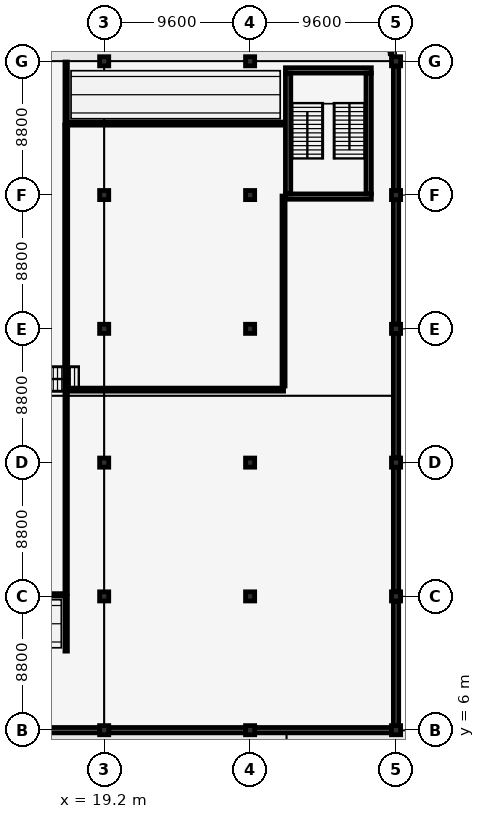
"""IFC4 building model, lengths in metres.
Left out: names, types, materials, properties, quantities, classifications, styles, units other than length and angle.
Written with IfcOpenShell. Run it as: python <this file> out.ifc"""

import sys

from ifc_helpers import new_model, si_unit, direction, frame, frame_2d, origin, origin_2d, place, context, subcontext, project, spatial, rectangle, extrude, element, fill, save


model = new_model("IFC4")
c1 = context("Model", 3, precision=1e-05, world=origin(), true_north=direction((0.0, 1.0)))
c2 = subcontext(c1, "Body", "Model", "MODEL_VIEW")
j1 = project(units=[si_unit("LENGTHUNIT", "METRE"), si_unit("PLANEANGLEUNIT", "RADIAN")], contexts=[c1])
p1 = place(None, origin())
s1 = spatial("IfcSite", under=j1, at=p1, CompositionType="ELEMENT")
p2 = place(p1, origin())
s2 = spatial("IfcBuilding", under=s1, at=p2, CompositionType="ELEMENT")
p3 = place(p2, origin())
s3 = spatial("IfcBuildingStorey", under=s2, at=p3, CompositionType="ELEMENT", Elevation=0.0)
for number, where, z_axis, x_axis in (
    (1, (19.2, 6.0, 0.0), (0.0, 0.0, 1.0), (1.0, 0.0, 0.0)),
    (2, (19.2, 14.8, 0.0), (0.0, 0.0, 1.0), (1.0, 0.0, 0.0)),
    (3, (19.2, 23.6, 0.0), (0.0, 0.0, 1.0), (1.0, 0.0, 0.0)),
    (4, (19.2, 32.4, 0.0), (0.0, 0.0, 1.0), (1.0, 0.0, 0.0)),
    (5, (19.2, 41.2, 0.0), (0.0, 0.0, 1.0), (1.0, 0.0, 0.0)),
    (6, (19.2, 50.0, 0.0), (0.0, 0.0, 1.0), (1.0, 0.0, 0.0)),
    (7, (28.8, 6.0, 0.0), (0.0, 0.0, 1.0), (1.0, 0.0, 0.0)),
    (8, (28.8, 14.8, 0.0), (0.0, 0.0, 1.0), (1.0, 0.0, 0.0)),
    (9, (28.8, 23.6, 0.0), (0.0, 0.0, 1.0), (1.0, 0.0, 0.0)),
    (10, (28.8, 32.4, 0.0), (0.0, 0.0, 1.0), (1.0, 0.0, 0.0)),
    (11, (28.8, 41.2, 0.0), (0.0, 0.0, 1.0), (1.0, 0.0, 0.0)),
    (12, (28.8, 50.0, 0.0), (0.0, 0.0, 1.0), (1.0, 0.0, 0.0)),
    (13, (38.4, 6.0, 0.0), (0.0, 0.0, 1.0), (1.0, 0.0, 0.0)),
    (14, (38.4, 14.8, 0.0), (0.0, 0.0, 1.0), (1.0, 0.0, 0.0)),
    (15, (38.4, 23.6, 0.0), (0.0, 0.0, 1.0), (1.0, 0.0, 0.0)),
    (16, (38.4, 32.4, 0.0), (0.0, 0.0, 1.0), (1.0, 0.0, 0.0)),
    (17, (38.4, 41.2, 0.0), (0.0, 0.0, 1.0), (1.0, 0.0, 0.0)),
    (18, (38.4, 50.0, 0.0), (0.0, 0.0, 1.0), (1.0, 0.0, 0.0)),
):
    element("IfcColumn", number, at=place(p3, frame(where, z_axis=z_axis, x_axis=x_axis)), inside=s3, PredefinedType="COLUMN", context=c2, shape_type="SweptSolid", body=[
        extrude(rectangle(XDim=0.6, YDim=0.6, at=origin_2d()), origin(), (0.0, 0.0, 1.0), 4.8),
    ])
p4 = place(p3, frame((9.9, 6.0, 0.0), z_axis=(0.0, 0.0, 1.0), x_axis=(1.0, 0.0, 0.0)))
e19 = element("IfcWall", 19, at=p4, inside=s3, PredefinedType="SOLIDWALL", context=c2, shape_type="SweptSolid", body=[
    extrude(rectangle(XDim=9.0, YDim=0.35, at=frame_2d((4.5, 0.0))), origin(), (0.0, 0.0, 1.0), 4.1),
])
p5 = place(p4, frame((1.6, 0.0, 0.0)))
e20 = element("IfcOpeningElement", 20, at=p5, cuts=e19, PredefinedType="OPENING", context=c2, shape_type="SweptSolid", body=[
    extrude(rectangle(XDim=1.96, YDim=2.37, at=frame_2d((0.98, 1.185))), frame((0.0, 0.185, 0.0), z_axis=(0.0, -1.0, 0.0), x_axis=(1.0, 0.0, 0.0)), (0.0, 0.0, 1.0), 0.37),
])
p6 = place(p4, frame((5.0, 0.0, 0.0)))
e21 = element("IfcOpeningElement", 21, at=p6, cuts=e19, PredefinedType="OPENING", context=c2, shape_type="SweptSolid", body=[
    extrude(rectangle(XDim=1.92, YDim=2.34, at=frame_2d((0.96, 1.17))), frame((0.0, 0.185, 0.0), z_axis=(0.0, -1.0, 0.0), x_axis=(1.0, 0.0, 0.0)), (0.0, 0.0, 1.0), 0.37),
])
p7 = place(p3, frame((19.5, 6.0, 0.0), z_axis=(0.0, 0.0, 1.0), x_axis=(1.0, 0.0, 0.0)))
e22 = element("IfcWall", 22, at=p7, inside=s3, PredefinedType="SOLIDWALL", context=c2, shape_type="SweptSolid", body=[
    extrude(rectangle(XDim=9.0, YDim=0.35, at=frame_2d((4.5, 0.0))), origin(), (0.0, 0.0, 1.0), 4.1),
])
p8 = place(p7, frame((3.4, 0.0, 1.0)))
e23 = element("IfcOpeningElement", 23, at=p8, cuts=e22, PredefinedType="OPENING", context=c2, shape_type="SweptSolid", body=[
    extrude(rectangle(XDim=1.8, YDim=1.8, at=frame_2d((0.9, 0.9))), frame((0.0, 0.185, 0.0), z_axis=(0.0, -1.0, 0.0), x_axis=(1.0, 0.0, 0.0)), (0.0, 0.0, 1.0), 0.37),
])
p9 = place(p3, frame((29.1, 6.0, 0.0), z_axis=(0.0, 0.0, 1.0), x_axis=(1.0, 0.0, 0.0)))
e24 = element("IfcWall", 24, at=p9, inside=s3, PredefinedType="SOLIDWALL", context=c2, shape_type="SweptSolid", body=[
    extrude(rectangle(XDim=9.0, YDim=0.35, at=frame_2d((4.5, 0.0))), origin(), (0.0, 0.0, 1.0), 4.1),
])
p10 = place(p9, frame((1.6, 0.0, 0.0)))
e25 = element("IfcOpeningElement", 25, at=p10, cuts=e24, PredefinedType="OPENING", context=c2, shape_type="SweptSolid", body=[
    extrude(rectangle(XDim=1.96, YDim=2.37, at=frame_2d((0.98, 1.185))), frame((0.0, 0.185, 0.0), z_axis=(0.0, -1.0, 0.0), x_axis=(1.0, 0.0, 0.0)), (0.0, 0.0, 1.0), 0.37),
])
p11 = place(p9, frame((5.0, 0.0, 0.0)))
e26 = element("IfcOpeningElement", 26, at=p11, cuts=e24, PredefinedType="OPENING", context=c2, shape_type="SweptSolid", body=[
    extrude(rectangle(XDim=1.92, YDim=2.34, at=frame_2d((0.96, 1.17))), frame((0.0, 0.185, 0.0), z_axis=(0.0, -1.0, 0.0), x_axis=(1.0, 0.0, 0.0)), (0.0, 0.0, 1.0), 0.37),
])
p12 = place(p3, frame((38.4, 6.3, 0.0), z_axis=(0.0, 0.0, 1.0), x_axis=(0.0, 1.0, 0.0)))
e27 = element("IfcWall", 27, at=p12, inside=s3, PredefinedType="SOLIDWALL", context=c2, shape_type="SweptSolid", body=[
    extrude(rectangle(XDim=8.2, YDim=0.35, at=frame_2d((4.1, 0.0))), origin(), (0.0, 0.0, 1.0), 4.1),
])
p13 = place(p12, frame((3.0, 0.0, 0.0)))
e28 = element("IfcOpeningElement", 28, at=p13, cuts=e27, PredefinedType="OPENING", context=c2, shape_type="SweptSolid", body=[
    extrude(rectangle(XDim=1.76, YDim=2.37, at=frame_2d((0.88, 1.185))), frame((0.0, 0.185, 0.0), z_axis=(0.0, -1.0, 0.0), x_axis=(1.0, 0.0, 0.0)), (0.0, 0.0, 1.0), 0.37),
])
p14 = place(p3, frame((38.4, 15.1, 0.0), z_axis=(0.0, 0.0, 1.0), x_axis=(0.0, 1.0, 0.0)))
e29 = element("IfcWall", 29, at=p14, inside=s3, PredefinedType="SOLIDWALL", context=c2, shape_type="SweptSolid", body=[
    extrude(rectangle(XDim=8.2, YDim=0.35, at=frame_2d((4.1, 0.0))), origin(), (0.0, 0.0, 1.0), 4.1),
])
p15 = place(p3, frame((38.4, 23.9, 0.0), z_axis=(0.0, 0.0, 1.0), x_axis=(0.0, 1.0, 0.0)))
e30 = element("IfcWall", 30, at=p15, inside=s3, PredefinedType="SOLIDWALL", context=c2, shape_type="SweptSolid", body=[
    extrude(rectangle(XDim=8.2, YDim=0.35, at=frame_2d((4.1, 0.0))), origin(), (0.0, 0.0, 1.0), 4.1),
])
p16 = place(p15, frame((3.0, 0.0, 0.0)))
e31 = element("IfcOpeningElement", 31, at=p16, cuts=e30, PredefinedType="OPENING", context=c2, shape_type="SweptSolid", body=[
    extrude(rectangle(XDim=1.72, YDim=2.34, at=frame_2d((0.86, 1.17))), frame((0.0, 0.185, 0.0), z_axis=(0.0, -1.0, 0.0), x_axis=(1.0, 0.0, 0.0)), (0.0, 0.0, 1.0), 0.37),
])
p17 = place(p3, frame((38.4, 32.7, 0.0), z_axis=(0.0, 0.0, 1.0), x_axis=(0.0, 1.0, 0.0)))
e32 = element("IfcWall", 32, at=p17, inside=s3, PredefinedType="SOLIDWALL", context=c2, shape_type="SweptSolid", body=[
    extrude(rectangle(XDim=8.2, YDim=0.35, at=frame_2d((4.1, 0.0))), origin(), (0.0, 0.0, 1.0), 4.1),
])
p18 = place(p3, frame((38.4, 41.5, 0.0), z_axis=(0.0, 0.0, 1.0), x_axis=(0.0, 1.0, 0.0)))
e33 = element("IfcWall", 33, at=p18, inside=s3, PredefinedType="SOLIDWALL", context=c2, shape_type="SweptSolid", body=[
    extrude(rectangle(XDim=8.2, YDim=0.35, at=frame_2d((4.1, 0.0))), origin(), (0.0, 0.0, 1.0), 4.1),
])
p19 = place(p18, frame((3.0, 0.0, 0.0)))
e34 = element("IfcOpeningElement", 34, at=p19, cuts=e33, PredefinedType="OPENING", context=c2, shape_type="SweptSolid", body=[
    extrude(rectangle(XDim=1.68, YDim=2.31, at=frame_2d((0.84, 1.155))), frame((0.0, 0.185, 0.0), z_axis=(0.0, -1.0, 0.0), x_axis=(1.0, 0.0, 0.0)), (0.0, 0.0, 1.0), 0.37),
])
for number, where, z_axis, x_axis in (
    (35, (36.775, 41.1, 0.0), (0.0, 0.0, 1.0), (-1.0, 0.0, 0.0)),
    (36, (31.125, 49.4, 0.0), (0.0, 0.0, 1.0), (1.0, 0.0, 0.0)),
):
    element("IfcWall", number, at=place(p3, frame(where, z_axis=z_axis, x_axis=x_axis)), inside=s3, PredefinedType="SHEAR", context=c2, shape_type="SweptSolid", body=[
        extrude(rectangle(XDim=5.65, YDim=0.35, at=frame_2d((2.825, 0.0))), origin(), (0.0, 0.0, 1.0), 4.55),
    ])
p20 = place(p3, frame((31.3, 41.275, 0.0), z_axis=(0.0, 0.0, 1.0), x_axis=(0.0, 1.0, 0.0)))
e37 = element("IfcWall", 37, at=p20, inside=s3, PredefinedType="SHEAR", context=c2, shape_type="SweptSolid", body=[
    extrude(rectangle(XDim=7.95, YDim=0.35, at=frame_2d((3.975, 0.0))), origin(), (0.0, 0.0, 1.0), 4.55),
])
p21 = place(p20, frame((5.1, 0.0, 0.0)))
e38 = element("IfcOpeningElement", 38, at=p21, cuts=e37, PredefinedType="OPENING", context=c2, shape_type="SweptSolid", body=[
    extrude(rectangle(XDim=2.05, YDim=2.15, at=frame_2d((1.025, 1.075))), frame((0.0, 0.185, 0.0), z_axis=(0.0, -1.0, 0.0), x_axis=(1.0, 0.0, 0.0)), (0.0, 0.0, 1.0), 0.37),
])
p22 = place(p3, frame((36.6, 49.225, 0.0), z_axis=(0.0, 0.0, 1.0), x_axis=(0.0, -1.0, 0.0)))
e39 = element("IfcWall", 39, at=p22, inside=s3, PredefinedType="SHEAR", context=c2, shape_type="SweptSolid", body=[
    extrude(rectangle(XDim=7.95, YDim=0.35, at=frame_2d((3.975, 0.0))), origin(), (0.0, 0.0, 1.0), 4.55),
])
p23 = place(p3, frame((16.8, 28.4, 0.0), z_axis=(0.0, 0.0, 1.0), x_axis=(1.0, 0.0, 0.0)))
e40 = element("IfcWall", 40, at=p23, inside=s3, PredefinedType="PARTITIONING", context=c2, shape_type="SweptSolid", body=[
    extrude(rectangle(XDim=14.2, YDim=0.2, at=frame_2d((7.1, 0.0))), origin(), (0.0, 0.0, 1.0), 4.42),
])
p24 = place(p3, frame((16.7, 11.2, 0.0), z_axis=(0.0, 0.0, 1.0), x_axis=(0.0, 1.0, 0.0)))
e41 = element("IfcWall", 41, at=p24, inside=s3, PredefinedType="PARTITIONING", context=c2, shape_type="SweptSolid", body=[
    extrude(rectangle(XDim=3.6, YDim=0.16, at=frame_2d((1.8, 0.0))), origin(), (0.0, 0.0, 1.0), 4.42),
])
p25 = place(p24, frame((0.9, 0.0, 0.0)))
e42 = element("IfcOpeningElement", 42, at=p25, cuts=e41, PredefinedType="OPENING", context=c2, shape_type="SweptSolid", body=[
    extrude(rectangle(XDim=1.8, YDim=2.15, at=frame_2d((0.9, 1.075))), frame((0.0, 0.09, 0.0), z_axis=(0.0, -1.0, 0.0), x_axis=(1.0, 0.0, 0.0)), (0.0, 0.0, 1.0), 0.18),
])
p26 = place(p3, frame((16.7, 15.0, 0.0), z_axis=(0.0, 0.0, 1.0), x_axis=(0.0, 1.0, 0.0)))
e43 = element("IfcWall", 43, at=p26, inside=s3, PredefinedType="PARTITIONING", context=c2, shape_type="SweptSolid", body=[
    extrude(rectangle(XDim=13.3, YDim=0.16, at=frame_2d((6.65, 0.0))), origin(), (0.0, 0.0, 1.0), 4.42),
])
p27 = place(p26, frame((5.75, 0.0, 0.0)))
e44 = element("IfcOpeningElement", 44, at=p27, cuts=e43, PredefinedType="OPENING", context=c2, shape_type="SweptSolid", body=[
    extrude(rectangle(XDim=1.8, YDim=2.15, at=frame_2d((0.9, 1.075))), frame((0.0, 0.09, 0.0), z_axis=(0.0, -1.0, 0.0), x_axis=(1.0, 0.0, 0.0)), (0.0, 0.0, 1.0), 0.18),
])
p28 = place(p3, frame((16.7, 28.5, 0.0), z_axis=(0.0, 0.0, 1.0), x_axis=(0.0, 1.0, 0.0)))
e45 = element("IfcWall", 45, at=p28, inside=s3, PredefinedType="PARTITIONING", context=c2, shape_type="SweptSolid", body=[
    extrude(rectangle(XDim=17.3, YDim=0.2, at=frame_2d((8.65, 0.0))), origin(), (0.0, 0.0, 1.0), 4.42),
])
p29 = place(p28, frame((7.85, 0.0, 0.0)))
e46 = element("IfcOpeningElement", 46, at=p29, cuts=e45, PredefinedType="OPENING", context=c2, shape_type="SweptSolid", body=[
    extrude(rectangle(XDim=1.6, YDim=2.15, at=frame_2d((0.8, 1.075))), frame((0.0, 0.11, 0.0), z_axis=(0.0, -1.0, 0.0), x_axis=(1.0, 0.0, 0.0)), (0.0, 0.0, 1.0), 0.22),
])
p30 = place(p3, frame((16.8, 45.9, 0.0), z_axis=(0.0, 0.0, 1.0), x_axis=(1.0, 0.0, 0.0)))
e47 = element("IfcWall", 47, at=p30, inside=s3, PredefinedType="PARTITIONING", context=c2, shape_type="SweptSolid", body=[
    extrude(rectangle(XDim=14.2, YDim=0.2, at=frame_2d((7.1, 0.0))), origin(), (0.0, 0.0, 1.0), 4.42),
])
p31 = place(p30, frame((6.3, 0.0, 0.0)))
e48 = element("IfcOpeningElement", 48, at=p31, cuts=e47, PredefinedType="OPENING", context=c2, shape_type="SweptSolid", body=[
    extrude(rectangle(XDim=1.6, YDim=2.15, at=frame_2d((0.8, 1.075))), frame((0.0, 0.11, 0.0), z_axis=(0.0, -1.0, 0.0), x_axis=(1.0, 0.0, 0.0)), (0.0, 0.0, 1.0), 0.22),
])
p32 = place(p3, frame((13.4, 14.9, 0.0), z_axis=(0.0, 0.0, 1.0), x_axis=(1.0, 0.0, 0.0)))
e49 = element("IfcWall", 49, at=p32, inside=s3, PredefinedType="PARTITIONING", context=c2, shape_type="SweptSolid", body=[
    extrude(rectangle(XDim=3.2, YDim=0.16, at=frame_2d((1.6, 0.0))), origin(), (0.0, 0.0, 1.0), 3.895),
])
p33 = place(p32, frame((0.7, 0.0, 0.0)))
e50 = element("IfcOpeningElement", 50, at=p33, cuts=e49, PredefinedType="OPENING", context=c2, shape_type="SweptSolid", body=[
    extrude(rectangle(XDim=1.8, YDim=2.15, at=frame_2d((0.9, 1.075))), frame((0.0, 0.09, 0.0), z_axis=(0.0, -1.0, 0.0), x_axis=(1.0, 0.0, 0.0)), (0.0, 0.0, 1.0), 0.18),
])
p34 = place(p3, frame((16.7, 46.0, 0.0), z_axis=(0.0, 0.0, 1.0), x_axis=(0.0, 1.0, 0.0)))
e51 = element("IfcWall", 51, at=p34, inside=s3, PredefinedType="PARTITIONING", context=c2, shape_type="SweptSolid", body=[
    extrude(rectangle(XDim=3.95, YDim=0.16, at=frame_2d((1.975, 0.0))), origin(), (0.0, 0.0, 1.0), 4.42),
])
p35 = place(p34, frame((1.075, 0.0, 0.0)))
e52 = element("IfcOpeningElement", 52, at=p35, cuts=e51, PredefinedType="OPENING", context=c2, shape_type="SweptSolid", body=[
    extrude(rectangle(XDim=1.8, YDim=2.15, at=frame_2d((0.9, 1.075))), frame((0.0, 0.09, 0.0), z_axis=(0.0, -1.0, 0.0), x_axis=(1.0, 0.0, 0.0)), (0.0, 0.0, 1.0), 0.18),
])
p36 = place(p3, frame((31.0, 28.64, 0.0), z_axis=(0.0, 0.0, 1.0), x_axis=(0.0, 1.0, 0.0)))
e53 = element("IfcWall", 53, at=p36, inside=s3, PredefinedType="PARTITIONING", context=c2, shape_type="SweptSolid", body=[
    extrude(rectangle(XDim=12.495, YDim=0.2, at=frame_2d((6.248, 0.0))), origin(), (0.0, 0.0, 1.0), 4.42),
])
p37 = place(p6, origin())
e54 = element("IfcDoor", 54, at=p37, inside=s3, OperationType="DOUBLE_DOOR_SINGLE_SWING", PredefinedType="DOOR", context=c2, shape_type="SweptSolid", body=[
    extrude(rectangle(XDim=1.92, YDim=2.34, at=frame_2d((0.96, 1.17))), frame((0.0, 0.025, 0.0), z_axis=(0.0, -1.0, 0.0), x_axis=(1.0, 0.0, 0.0)), (0.0, 0.0, 1.0), 0.05),
])
fill(e21, e54)
p38 = place(p8, origin())
e55 = element("IfcWindow", 55, at=p38, inside=s3, PartitioningType="SINGLE_PANEL", PredefinedType="WINDOW", context=c2, shape_type="SweptSolid", body=[
    extrude(rectangle(XDim=1.8, YDim=1.8, at=frame_2d((0.9, 0.9))), frame((0.0, 0.03, 0.0), z_axis=(0.0, -1.0, 0.0), x_axis=(1.0, 0.0, 0.0)), (0.0, 0.0, 1.0), 0.06),
])
fill(e23, e55)
p39 = place(p10, origin())
e56 = element("IfcDoor", 56, at=p39, inside=s3, OperationType="DOUBLE_DOOR_SINGLE_SWING", PredefinedType="DOOR", context=c2, shape_type="SweptSolid", body=[
    extrude(rectangle(XDim=1.96, YDim=2.37, at=frame_2d((0.98, 1.185))), frame((0.0, 0.025, 0.0), z_axis=(0.0, -1.0, 0.0), x_axis=(1.0, 0.0, 0.0)), (0.0, 0.0, 1.0), 0.05),
])
fill(e25, e56)
p40 = place(p11, origin())
e57 = element("IfcDoor", 57, at=p40, inside=s3, OperationType="DOUBLE_DOOR_SINGLE_SWING", PredefinedType="DOOR", context=c2, shape_type="SweptSolid", body=[
    extrude(rectangle(XDim=1.92, YDim=2.34, at=frame_2d((0.96, 1.17))), frame((0.0, 0.025, 0.0), z_axis=(0.0, -1.0, 0.0), x_axis=(1.0, 0.0, 0.0)), (0.0, 0.0, 1.0), 0.05),
])
fill(e26, e57)
p41 = place(p13, origin())
e58 = element("IfcDoor", 58, at=p41, inside=s3, OperationType="DOUBLE_DOOR_SINGLE_SWING", PredefinedType="DOOR", context=c2, shape_type="SweptSolid", body=[
    extrude(rectangle(XDim=1.76, YDim=2.37, at=frame_2d((0.88, 1.185))), frame((0.0, 0.025, 0.0), z_axis=(0.0, -1.0, 0.0), x_axis=(1.0, 0.0, 0.0)), (0.0, 0.0, 1.0), 0.05),
])
fill(e28, e58)
p42 = place(p16, origin())
e59 = element("IfcDoor", 59, at=p42, inside=s3, OperationType="DOUBLE_DOOR_SINGLE_SWING", PredefinedType="DOOR", context=c2, shape_type="SweptSolid", body=[
    extrude(rectangle(XDim=1.72, YDim=2.34, at=frame_2d((0.86, 1.17))), frame((0.0, 0.025, 0.0), z_axis=(0.0, -1.0, 0.0), x_axis=(1.0, 0.0, 0.0)), (0.0, 0.0, 1.0), 0.05),
])
fill(e31, e59)
p43 = place(p19, origin())
e60 = element("IfcDoor", 60, at=p43, inside=s3, OperationType="DOUBLE_DOOR_SINGLE_SWING", PredefinedType="DOOR", context=c2, shape_type="SweptSolid", body=[
    extrude(rectangle(XDim=1.68, YDim=2.31, at=frame_2d((0.84, 1.155))), frame((0.0, 0.025, 0.0), z_axis=(0.0, -1.0, 0.0), x_axis=(1.0, 0.0, 0.0)), (0.0, 0.0, 1.0), 0.05),
])
fill(e34, e60)
p44 = place(p21, origin())
e61 = element("IfcDoor", 61, at=p44, inside=s3, OperationType="DOUBLE_DOOR_SINGLE_SWING", PredefinedType="DOOR", context=c2, shape_type="SweptSolid", body=[
    extrude(rectangle(XDim=2.05, YDim=2.15, at=frame_2d((1.025, 1.075))), frame((0.0, 0.025, 0.0), z_axis=(0.0, -1.0, 0.0), x_axis=(1.0, 0.0, 0.0)), (0.0, 0.0, 1.0), 0.05),
])
fill(e38, e61)
p45 = place(p25, origin())
e62 = element("IfcDoor", 62, at=p45, inside=s3, OperationType="DOUBLE_DOOR_SINGLE_SWING", PredefinedType="DOOR", context=c2, shape_type="SweptSolid", body=[
    extrude(rectangle(XDim=1.8, YDim=2.15, at=frame_2d((0.9, 1.075))), frame((0.0, 0.025, 0.0), z_axis=(0.0, -1.0, 0.0), x_axis=(1.0, 0.0, 0.0)), (0.0, 0.0, 1.0), 0.05),
])
fill(e42, e62)
p46 = place(p27, origin())
e63 = element("IfcDoor", 63, at=p46, inside=s3, OperationType="DOUBLE_DOOR_SINGLE_SWING", PredefinedType="DOOR", context=c2, shape_type="SweptSolid", body=[
    extrude(rectangle(XDim=1.8, YDim=2.15, at=frame_2d((0.9, 1.075))), frame((0.0, 0.025, 0.0), z_axis=(0.0, -1.0, 0.0), x_axis=(1.0, 0.0, 0.0)), (0.0, 0.0, 1.0), 0.05),
])
fill(e44, e63)
p47 = place(p29, origin())
e64 = element("IfcDoor", 64, at=p47, inside=s3, OperationType="DOUBLE_DOOR_SINGLE_SWING", PredefinedType="DOOR", context=c2, shape_type="SweptSolid", body=[
    extrude(rectangle(XDim=1.6, YDim=2.15, at=frame_2d((0.8, 1.075))), frame((0.0, 0.025, 0.0), z_axis=(0.0, -1.0, 0.0), x_axis=(1.0, 0.0, 0.0)), (0.0, 0.0, 1.0), 0.05),
])
fill(e46, e64)
p48 = place(p31, origin())
e65 = element("IfcDoor", 65, at=p48, inside=s3, OperationType="DOUBLE_DOOR_SINGLE_SWING", PredefinedType="DOOR", context=c2, shape_type="SweptSolid", body=[
    extrude(rectangle(XDim=1.6, YDim=2.15, at=frame_2d((0.8, 1.075))), frame((0.0, 0.025, 0.0), z_axis=(0.0, -1.0, 0.0), x_axis=(1.0, 0.0, 0.0)), (0.0, 0.0, 1.0), 0.05),
])
fill(e48, e65)
p49 = place(p33, origin())
e66 = element("IfcDoor", 66, at=p49, inside=s3, OperationType="DOUBLE_DOOR_SINGLE_SWING", PredefinedType="DOOR", context=c2, shape_type="SweptSolid", body=[
    extrude(rectangle(XDim=1.8, YDim=2.15, at=frame_2d((0.9, 1.075))), frame((0.0, 0.025, 0.0), z_axis=(0.0, -1.0, 0.0), x_axis=(1.0, 0.0, 0.0)), (0.0, 0.0, 1.0), 0.05),
])
fill(e50, e66)
p50 = place(p35, origin())
e67 = element("IfcDoor", 67, at=p50, inside=s3, OperationType="DOUBLE_DOOR_SINGLE_SWING", PredefinedType="DOOR", context=c2, shape_type="SweptSolid", body=[
    extrude(rectangle(XDim=1.8, YDim=2.15, at=frame_2d((0.9, 1.075))), frame((0.0, 0.025, 0.0), z_axis=(0.0, -1.0, 0.0), x_axis=(1.0, 0.0, 0.0)), (0.0, 0.0, 1.0), 0.05),
])
fill(e52, e67)
save(model, sys.argv[1])
